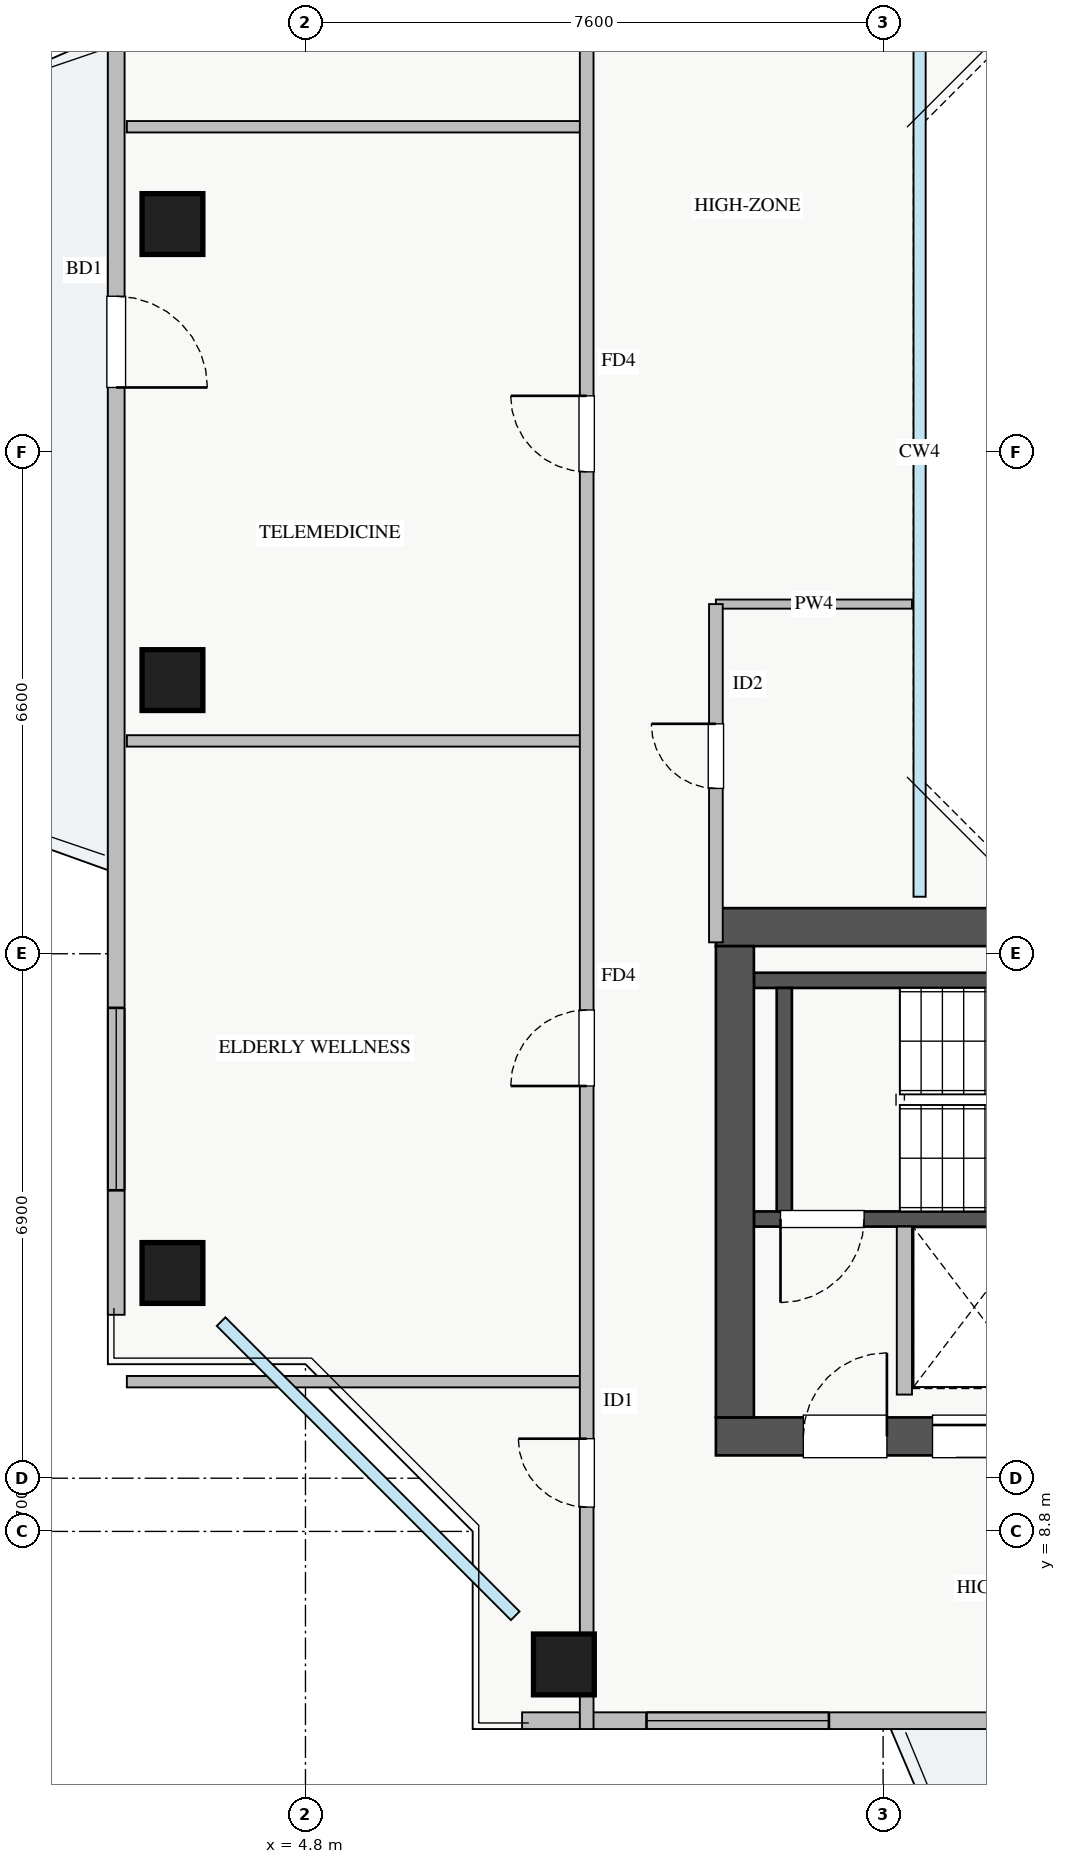
"""IFC4 building model, lengths in metres.
Left out: names, types, materials, properties, quantities, classifications, styles, units other than length and angle.
Written with IfcOpenShell. Run it as: python <this file> out.ifc"""

import sys

from ifc_helpers import new_model, si_unit, direction, frame, frame_2d, origin, origin_2d, place, context, subcontext, project, spatial, rectangle, extrude, source, transform, mapped, element, fill, save


model = new_model("IFC4")
c1 = context("Model", 3, precision=1e-05, world=origin(), true_north=direction((0.0, 1.0)))
c2 = subcontext(c1, "Body", "Model", "MODEL_VIEW")
j1 = project(units=[si_unit("LENGTHUNIT", "METRE"), si_unit("PLANEANGLEUNIT", "RADIAN")], contexts=[c1])
p1 = place(None, origin())
s1 = spatial("IfcSite", under=j1, at=p1, CompositionType="ELEMENT")
p2 = place(p1, origin())
s2 = spatial("IfcBuilding", under=s1, at=p2, CompositionType="ELEMENT")
p3 = place(p2, frame((0.0, 0.0, 223.0)))
s3 = spatial("IfcBuildingStorey", under=s2, at=p3, CompositionType="ELEMENT", Elevation=223.0)
p4 = place(p3, frame((12.68, 12.8, 0.0), z_axis=(0.0, 0.0, 1.0), x_axis=(1.0, 0.0, 0.0)))
e1 = element("IfcWall", 1, at=p4, inside=s3, PredefinedType="SHEAR", context=c2, shape_type="SweptSolid", body=[
    extrude(rectangle(XDim=1.94, YDim=0.18, at=frame_2d((0.97, 0.0))), origin(), (0.0, 0.0, 1.0), 3.07),
])
p5 = place(p3, frame((10.7, 12.91, 0.0), z_axis=(0.0, 0.0, 1.0), x_axis=(1.0, 0.0, 0.0)))
e2 = element("IfcWall", 2, at=p5, inside=s3, PredefinedType="SHEAR", context=c2, shape_type="SweptSolid", body=[
    extrude(rectangle(XDim=7.45, YDim=0.2, at=frame_2d((3.725, 0.0))), origin(), (0.0, 0.0, 1.0), 3.25),
])
p6 = place(p5, frame((0.35, 0.0, 0.0)))
e3 = element("IfcOpeningElement", 3, at=p6, cuts=e2, PredefinedType="OPENING", context=c2, shape_type="SweptSolid", body=[
    extrude(rectangle(XDim=1.1, YDim=2.05, at=frame_2d((0.55, 1.025))), frame((0.0, 0.11, 0.0), z_axis=(0.0, -1.0, 0.0), x_axis=(1.0, 0.0, 0.0)), (0.0, 0.0, 1.0), 0.22),
])
p7 = place(p3, frame((10.7, 16.05, 0.0), z_axis=(0.0, 0.0, 1.0), x_axis=(1.0, 0.0, 0.0)))
e4 = element("IfcWall", 4, at=p7, inside=s3, PredefinedType="SHEAR", context=c2, shape_type="SweptSolid", body=[
    extrude(rectangle(XDim=7.45, YDim=0.2, at=frame_2d((3.725, 0.0))), origin(), (0.0, 0.0, 1.0), 3.25),
])
p8 = place(p3, frame((11.1, 13.01, 0.0), z_axis=(0.0, 0.0, 1.0), x_axis=(0.0, 1.0, 0.0)))
e5 = element("IfcWall", 5, at=p8, inside=s3, PredefinedType="SHEAR", context=c2, shape_type="SweptSolid", body=[
    extrude(rectangle(XDim=2.94, YDim=0.2, at=frame_2d((1.47, 0.0))), origin(), (0.0, 0.0, 1.0), 3.25),
])
p9 = place(p3, frame((10.2, 10.05, 0.0), z_axis=(0.0, 0.0, 1.0), x_axis=(1.0, 0.0, 0.0)))
e6 = element("IfcWall", 6, at=p9, inside=s3, PredefinedType="SHEAR", context=c2, shape_type="SweptSolid", body=[
    extrude(rectangle(XDim=17.6, YDim=0.5, at=frame_2d((8.8, 0.0))), origin(), (0.0, 0.0, 1.0), 3.25),
])
p10 = place(p9, frame((1.15, 0.0, 0.0)))
e7 = element("IfcOpeningElement", 7, at=p10, cuts=e6, PredefinedType="OPENING", context=c2, shape_type="SweptSolid", body=[
    extrude(rectangle(XDim=1.1, YDim=2.05, at=frame_2d((0.55, 1.025))), frame((0.0, 0.26, 0.0), z_axis=(0.0, -1.0, 0.0), x_axis=(1.0, 0.0, 0.0)), (0.0, 0.0, 1.0), 0.52),
])
p11 = place(p9, frame((8.3, 0.0, 0.0)))
e8 = element("IfcOpeningElement", 8, at=p11, cuts=e6, PredefinedType="OPENING", context=c2, shape_type="SweptSolid", body=[
    extrude(rectangle(XDim=1.1, YDim=2.05, at=frame_2d((0.55, 1.025))), frame((0.0, 0.26, 0.0), z_axis=(0.0, -1.0, 0.0), x_axis=(1.0, 0.0, 0.0)), (0.0, 0.0, 1.0), 0.52),
])
p12 = place(p9, frame((2.85, 0.0, 0.0)))
e9 = element("IfcOpeningElement", 9, at=p12, cuts=e6, PredefinedType="OPENING", context=c2, shape_type="SweptSolid", body=[
    extrude(rectangle(XDim=1.1, YDim=2.05, at=frame_2d((0.55, 1.025))), frame((0.0, 0.26, 0.0), z_axis=(0.0, -1.0, 0.0), x_axis=(1.0, 0.0, 0.0)), (0.0, 0.0, 1.0), 0.52),
])
p13 = place(p9, frame((5.8, 0.0, 0.0)))
e10 = element("IfcOpeningElement", 10, at=p13, cuts=e6, PredefinedType="OPENING", context=c2, shape_type="SweptSolid", body=[
    extrude(rectangle(XDim=1.0, YDim=2.05, at=frame_2d((0.5, 1.025))), frame((0.0, 0.26, 0.0), z_axis=(0.0, -1.0, 0.0), x_axis=(1.0, 0.0, 0.0)), (0.0, 0.0, 1.0), 0.52),
])
p14 = place(p9, frame((14.74, 0.0, 0.0)))
e11 = element("IfcOpeningElement", 11, at=p14, cuts=e6, PredefinedType="OPENING", context=c2, shape_type="SweptSolid", body=[
    extrude(rectangle(XDim=1.0, YDim=2.05, at=frame_2d((0.5, 1.025))), frame((0.0, 0.26, 0.0), z_axis=(0.0, -1.0, 0.0), x_axis=(1.0, 0.0, 0.0)), (0.0, 0.0, 1.0), 0.52),
])
p15 = place(p9, frame((10.155, 0.0, 0.0)))
e12 = element("IfcOpeningElement", 12, at=p15, cuts=e6, PredefinedType="OPENING", context=c2, shape_type="SweptSolid", body=[
    extrude(rectangle(XDim=1.0, YDim=2.05, at=frame_2d((0.5, 1.025))), frame((0.0, 0.26, 0.0), z_axis=(0.0, -1.0, 0.0), x_axis=(1.0, 0.0, 0.0)), (0.0, 0.0, 1.0), 0.52),
])
p16 = place(p9, frame((11.87, 0.0, 0.0)))
e13 = element("IfcOpeningElement", 13, at=p16, cuts=e6, PredefinedType="OPENING", context=c2, shape_type="SweptSolid", body=[
    extrude(rectangle(XDim=1.0, YDim=2.05, at=frame_2d((0.5, 1.025))), frame((0.0, 0.26, 0.0), z_axis=(0.0, -1.0, 0.0), x_axis=(1.0, 0.0, 0.0)), (0.0, 0.0, 1.0), 0.52),
])
p17 = place(p9, frame((13.46, 0.0, 0.0)))
e14 = element("IfcOpeningElement", 14, at=p17, cuts=e6, PredefinedType="OPENING", context=c2, shape_type="SweptSolid", body=[
    extrude(rectangle(XDim=1.0, YDim=2.05, at=frame_2d((0.5, 1.025))), frame((0.0, 0.26, 0.0), z_axis=(0.0, -1.0, 0.0), x_axis=(1.0, 0.0, 0.0)), (0.0, 0.0, 1.0), 0.52),
])
p18 = place(p3, frame((10.2, 16.75, 0.0), z_axis=(0.0, 0.0, 1.0), x_axis=(1.0, 0.0, 0.0)))
e15 = element("IfcWall", 15, at=p18, inside=s3, PredefinedType="SHEAR", context=c2, shape_type="SweptSolid", body=[
    extrude(rectangle(XDim=17.6, YDim=0.5, at=frame_2d((8.8, 0.0))), origin(), (0.0, 0.0, 1.0), 3.25),
])
p19 = place(p3, frame((10.45, 10.3, 0.0), z_axis=(0.0, 0.0, 1.0), x_axis=(0.0, 1.0, 0.0)))
e16 = element("IfcWall", 16, at=p19, inside=s3, PredefinedType="SHEAR", context=c2, shape_type="SweptSolid", body=[
    extrude(rectangle(XDim=6.2, YDim=0.5, at=frame_2d((3.1, 0.0))), origin(), (0.0, 0.0, 1.0), 3.25),
])
m1 = source(origin(), c2, "Body", "SweptSolid", [
    extrude(rectangle(XDim=0.8, YDim=0.8, at=origin_2d()), origin(), (0.0, 0.0, 1.0), 3.25),
])
for number, where, z_axis, x_axis in (
    (17, (8.2, 7.05, 0.0), (0.0, 0.0, 1.0), (1.0, 0.0, 0.0)),
    (18, (3.05, 26.0, 0.0), (0.0, 0.0, 1.0), (1.0, 0.0, 0.0)),
    (19, (3.05, 20.0, 0.0), (0.0, 0.0, 1.0), (1.0, 0.0, 0.0)),
    (20, (3.05, 12.2, 0.0), (0.0, 0.0, 1.0), (1.0, 0.0, 0.0)),
):
    element("IfcColumn", number, at=place(p3, frame(where, z_axis=z_axis, x_axis=x_axis)), inside=s3, PredefinedType="COLUMN", context=c2, shape_type="MappedRepresentation", body=[
        mapped(m1, transform((0.0, 0.0, 0.0), x_axis=(1.0, 0.0, 0.0), y_axis=(0.0, 1.0, 0.0), z_axis=(0.0, 0.0, 1.0), scale=1.0)),
    ])
p20 = place(p3, frame((7.65, 6.31, 0.0), z_axis=(0.0, 0.0, 1.0), x_axis=(1.0, 0.0, 0.0)))
e21 = element("IfcWall", 21, at=p20, inside=s3, PredefinedType="STANDARD", context=c2, shape_type="SweptSolid", body=[
    extrude(rectangle(XDim=22.7, YDim=0.22, at=frame_2d((11.35, 0.0))), origin(), (0.0, 0.0, 1.0), 2.61),
])
p21 = place(p20, frame((12.2, 0.0, 0.0)))
e22 = element("IfcOpeningElement", 22, at=p21, cuts=e21, PredefinedType="OPENING", context=c2, shape_type="SweptSolid", body=[
    extrude(rectangle(XDim=1.2, YDim=2.1, at=frame_2d((0.6, 1.05))), frame((0.0, 0.12, 0.0), z_axis=(0.0, -1.0, 0.0), x_axis=(1.0, 0.0, 0.0)), (0.0, 0.0, 1.0), 0.24),
])
p22 = place(p20, frame((1.637, 0.0, 0.9)))
e23 = element("IfcOpeningElement", 23, at=p22, cuts=e21, PredefinedType="OPENING", context=c2, shape_type="SweptSolid", body=[
    extrude(rectangle(XDim=2.4, YDim=1.48, at=frame_2d((1.2, 0.74))), frame((0.0, 0.12, 0.0), z_axis=(0.0, -1.0, 0.0), x_axis=(1.0, 0.0, 0.0)), (0.0, 0.0, 1.0), 0.24),
])
p23 = place(p20, frame((7.612, 0.0, 0.9)))
e24 = element("IfcOpeningElement", 24, at=p23, cuts=e21, PredefinedType="OPENING", context=c2, shape_type="SweptSolid", body=[
    extrude(rectangle(XDim=1.8, YDim=1.45, at=frame_2d((0.9, 0.725))), frame((0.0, 0.12, 0.0), z_axis=(0.0, -1.0, 0.0), x_axis=(1.0, 0.0, 0.0)), (0.0, 0.0, 1.0), 0.24),
])
p24 = place(p20, frame((19.788, 0.0, 0.9)))
e25 = element("IfcOpeningElement", 25, at=p24, cuts=e21, PredefinedType="OPENING", context=c2, shape_type="SweptSolid", body=[
    extrude(rectangle(XDim=2.1, YDim=1.5, at=frame_2d((1.05, 0.75))), frame((0.0, 0.12, 0.0), z_axis=(0.0, -1.0, 0.0), x_axis=(1.0, 0.0, 0.0)), (0.0, 0.0, 1.0), 0.24),
])
p25 = place(p3, frame((2.31, 11.65, 0.0), z_axis=(0.0, 0.0, 1.0), x_axis=(0.0, 1.0, 0.0)))
e26 = element("IfcWall", 26, at=p25, inside=s3, PredefinedType="STANDARD", context=c2, shape_type="SweptSolid", body=[
    extrude(rectangle(XDim=22.7, YDim=0.22, at=frame_2d((11.35, 0.0))), origin(), (0.0, 0.0, 1.0), 2.61),
])
p26 = place(p25, frame((12.2, 0.0, 0.0)))
e27 = element("IfcOpeningElement", 27, at=p26, cuts=e26, PredefinedType="OPENING", context=c2, shape_type="SweptSolid", body=[
    extrude(rectangle(XDim=1.2, YDim=2.1, at=frame_2d((0.6, 1.05))), frame((0.0, 0.12, 0.0), z_axis=(0.0, -1.0, 0.0), x_axis=(1.0, 0.0, 0.0)), (0.0, 0.0, 1.0), 0.24),
])
p27 = place(p25, frame((1.638, 0.0, 0.9)))
e28 = element("IfcOpeningElement", 28, at=p27, cuts=e26, PredefinedType="OPENING", context=c2, shape_type="SweptSolid", body=[
    extrude(rectangle(XDim=2.4, YDim=1.48, at=frame_2d((1.2, 0.74))), frame((0.0, 0.12, 0.0), z_axis=(0.0, -1.0, 0.0), x_axis=(1.0, 0.0, 0.0)), (0.0, 0.0, 1.0), 0.24),
])
p28 = place(p25, frame((18.813, 0.0, 0.9)))
e29 = element("IfcOpeningElement", 29, at=p28, cuts=e26, PredefinedType="OPENING", context=c2, shape_type="SweptSolid", body=[
    extrude(rectangle(XDim=2.1, YDim=1.48, at=frame_2d((1.05, 0.74))), frame((0.0, 0.12, 0.0), z_axis=(0.0, -1.0, 0.0), x_axis=(1.0, 0.0, 0.0)), (0.0, 0.0, 1.0), 0.24),
])
p29 = place(p3, frame((12.68, 10.6, 0.0), z_axis=(0.0, 0.0, 1.0), x_axis=(0.0, 1.0, 0.0)))
e30 = element("IfcWall", 30, at=p29, inside=s3, PredefinedType="PARTITIONING", context=c2, shape_type="SweptSolid", body=[
    extrude(rectangle(XDim=2.21, YDim=0.2, at=frame_2d((1.105, 0.0))), origin(), (0.0, 0.0, 1.0), 3.07),
])
for number, where, z_axis, x_axis in (
    (31, (2.45, 10.77, 0.0), (0.0, 0.0, 1.0), (1.0, 0.0, 0.0)),
    (32, (2.45, 19.2, 0.0), (0.0, 0.0, 1.0), (1.0, 0.0, 0.0)),
    (33, (2.45, 27.28, 0.0), (0.0, 0.0, 1.0), (1.0, 0.0, 0.0)),
):
    element("IfcWall", number, at=place(p3, frame(where, z_axis=z_axis, x_axis=x_axis)), inside=s3, PredefinedType="PARTITIONING", context=c2, shape_type="SweptSolid", body=[
        extrude(rectangle(XDim=6.05, YDim=0.15, at=frame_2d((3.025, 0.0))), origin(), (0.0, 0.0, 1.0), 3.07),
    ])
p30 = place(p3, frame((8.5, 6.2, 0.0), z_axis=(0.0, 0.0, 1.0), x_axis=(0.0, 1.0, 0.0)))
e34 = element("IfcWall", 34, at=p30, inside=s3, PredefinedType="PARTITIONING", context=c2, shape_type="SweptSolid", body=[
    extrude(rectangle(XDim=33.6, YDim=0.18, at=frame_2d((16.8, 0.0))), origin(), (0.0, 0.0, 1.0), 3.07),
])
p31 = place(p30, frame((29.605, 0.0, 0.0)))
e35 = element("IfcOpeningElement", 35, at=p31, cuts=e34, PredefinedType="OPENING", context=c2, shape_type="SweptSolid", body=[
    extrude(rectangle(XDim=0.9, YDim=2.05, at=frame_2d((0.45, 1.025))), frame((0.0, 0.1, 0.0), z_axis=(0.0, -1.0, 0.0), x_axis=(1.0, 0.0, 0.0)), (0.0, 0.0, 1.0), 0.2),
])
p32 = place(p30, frame((2.92, 0.0, 0.0)))
e36 = element("IfcOpeningElement", 36, at=p32, cuts=e34, PredefinedType="OPENING", context=c2, shape_type="SweptSolid", body=[
    extrude(rectangle(XDim=0.9, YDim=2.05, at=frame_2d((0.45, 1.025))), frame((0.0, 0.1, 0.0), z_axis=(0.0, -1.0, 0.0), x_axis=(1.0, 0.0, 0.0)), (0.0, 0.0, 1.0), 0.2),
])
p33 = place(p30, frame((8.46, 0.0, 0.0)))
e37 = element("IfcOpeningElement", 37, at=p33, cuts=e34, PredefinedType="OPENING", context=c2, shape_type="SweptSolid", body=[
    extrude(rectangle(XDim=1.0, YDim=2.05, at=frame_2d((0.5, 1.025))), frame((0.0, 0.1, 0.0), z_axis=(0.0, -1.0, 0.0), x_axis=(1.0, 0.0, 0.0)), (0.0, 0.0, 1.0), 0.2),
])
p34 = place(p30, frame((16.54, 0.0, 0.0)))
e38 = element("IfcOpeningElement", 38, at=p34, cuts=e34, PredefinedType="OPENING", context=c2, shape_type="SweptSolid", body=[
    extrude(rectangle(XDim=1.0, YDim=2.05, at=frame_2d((0.5, 1.025))), frame((0.0, 0.1, 0.0), z_axis=(0.0, -1.0, 0.0), x_axis=(1.0, 0.0, 0.0)), (0.0, 0.0, 1.0), 0.2),
])
p35 = place(p30, frame((24.38, 0.0, 0.0)))
e39 = element("IfcOpeningElement", 39, at=p35, cuts=e34, PredefinedType="OPENING", context=c2, shape_type="SweptSolid", body=[
    extrude(rectangle(XDim=1.0, YDim=2.05, at=frame_2d((0.5, 1.025))), frame((0.0, 0.1, 0.0), z_axis=(0.0, -1.0, 0.0), x_axis=(1.0, 0.0, 0.0)), (0.0, 0.0, 1.0), 0.2),
])
p36 = place(p3, frame((10.2, 21.0, 0.0), z_axis=(0.0, 0.0, 1.0), x_axis=(1.0, 0.0, 0.0)))
e40 = element("IfcWall", 40, at=p36, inside=s3, PredefinedType="PLUMBINGWALL", context=c2, shape_type="SweptSolid", body=[
    extrude(rectangle(XDim=2.58, YDim=0.12, at=frame_2d((1.29, 0.0))), origin(), (0.0, 0.0, 1.0), 3.07),
])
p37 = place(p3, frame((10.2, 16.55, 0.0), z_axis=(0.0, 0.0, 1.0), x_axis=(0.0, 1.0, 0.0)))
e41 = element("IfcWall", 41, at=p37, inside=s3, PredefinedType="PARTITIONING", context=c2, shape_type="SweptSolid", body=[
    extrude(rectangle(XDim=4.45, YDim=0.18, at=frame_2d((2.225, 0.0))), origin(), (0.0, 0.0, 1.0), 3.07),
])
p38 = place(p37, frame((2.025, 0.0, 0.0)))
e42 = element("IfcOpeningElement", 42, at=p38, cuts=e41, PredefinedType="OPENING", context=c2, shape_type="SweptSolid", body=[
    extrude(rectangle(XDim=0.85, YDim=2.05, at=frame_2d((0.425, 1.025))), frame((0.0, 0.1, 0.0), z_axis=(0.0, -1.0, 0.0), x_axis=(1.0, 0.0, 0.0)), (0.0, 0.0, 1.0), 0.2),
])
m2 = source(origin(), c2, "Body", "SweptSolid", [
    extrude(rectangle(XDim=2.4, YDim=1.48, at=frame_2d((1.2, 0.74))), frame((0.0, 0.03, 0.0), z_axis=(0.0, -1.0, 0.0), x_axis=(1.0, 0.0, 0.0)), (0.0, 0.0, 1.0), 0.06),
])
p39 = place(p22, origin())
e43 = element("IfcWindow", 43, at=p39, inside=s3, PartitioningType="TRIPLE_PANEL_VERTICAL", PredefinedType="WINDOW", context=c2, shape_type="MappedRepresentation", body=[
    mapped(m2, transform((0.0, 0.0, 0.0), x_axis=(1.0, 0.0, 0.0), y_axis=(0.0, 1.0, 0.0), z_axis=(0.0, 0.0, 1.0), scale=1.0)),
])
fill(e23, e43)
m3 = source(origin(), c2, "Body", "SweptSolid", [
    extrude(rectangle(XDim=1.2, YDim=2.1, at=frame_2d((0.6, 1.05))), frame((0.0, 0.025, 0.0), z_axis=(0.0, -1.0, 0.0), x_axis=(1.0, 0.0, 0.0)), (0.0, 0.0, 1.0), 0.05),
])
p40 = place(p26, frame((1.2, 0.0, 0.0), z_axis=(0.0, 0.0, 1.0), x_axis=(-1.0, 0.0, 0.0)))
e44 = element("IfcDoor", 44, at=p40, inside=s3, OperationType="SINGLE_SWING_LEFT", PredefinedType="DOOR", context=c2, shape_type="MappedRepresentation", body=[
    mapped(m3, transform((0.0, 0.0, 0.0), x_axis=(1.0, 0.0, 0.0), y_axis=(0.0, 1.0, 0.0), z_axis=(0.0, 0.0, 1.0), scale=1.0)),
])
fill(e27, e44)
p41 = place(p27, origin())
e45 = element("IfcWindow", 45, at=p41, inside=s3, PartitioningType="TRIPLE_PANEL_VERTICAL", PredefinedType="WINDOW", context=c2, shape_type="MappedRepresentation", body=[
    mapped(m2, transform((0.0, 0.0, 0.0), x_axis=(1.0, 0.0, 0.0), y_axis=(0.0, 1.0, 0.0), z_axis=(0.0, 0.0, 1.0), scale=1.0)),
])
fill(e28, e45)
m4 = source(origin(), c2, "Body", "SweptSolid", [
    extrude(rectangle(XDim=1.1, YDim=2.05, at=frame_2d((0.55, 1.025))), frame((0.0, 0.025, 0.0), z_axis=(0.0, -1.0, 0.0), x_axis=(1.0, 0.0, 0.0)), (0.0, 0.0, 1.0), 0.05),
])
p42 = place(p10, origin())
e46 = element("IfcDoor", 46, at=p42, inside=s3, OperationType="SINGLE_SWING_RIGHT", PredefinedType="DOOR", context=c2, shape_type="MappedRepresentation", body=[
    mapped(m4, transform((0.0, 0.0, 0.0), x_axis=(1.0, 0.0, 0.0), y_axis=(0.0, 1.0, 0.0), z_axis=(0.0, 0.0, 1.0), scale=1.0)),
])
fill(e7, e46)
p43 = place(p6, frame((1.1, 0.0, 0.0), z_axis=(0.0, 0.0, 1.0), x_axis=(-1.0, 0.0, 0.0)))
e47 = element("IfcDoor", 47, at=p43, inside=s3, OperationType="SINGLE_SWING_LEFT", PredefinedType="DOOR", context=c2, shape_type="MappedRepresentation", body=[
    mapped(m4, transform((0.0, 0.0, 0.0), x_axis=(1.0, 0.0, 0.0), y_axis=(0.0, 1.0, 0.0), z_axis=(0.0, 0.0, 1.0), scale=1.0)),
])
fill(e3, e47)
p44 = place(p12, origin())
e48 = element("IfcDoor", 48, at=p44, inside=s3, OperationType="SLIDING_TO_RIGHT", PredefinedType="DOOR", context=c2, shape_type="MappedRepresentation", body=[
    mapped(m4, transform((0.0, 0.0, 0.0), x_axis=(1.0, 0.0, 0.0), y_axis=(0.0, 1.0, 0.0), z_axis=(0.0, 0.0, 1.0), scale=1.0)),
])
fill(e9, e48)
m5 = source(origin(), c2, "Body", "SweptSolid", [
    extrude(rectangle(XDim=0.9, YDim=2.05, at=frame_2d((0.45, 1.025))), frame((0.0, 0.025, 0.0), z_axis=(0.0, -1.0, 0.0), x_axis=(1.0, 0.0, 0.0)), (0.0, 0.0, 1.0), 0.05),
])
p45 = place(p32, origin())
e49 = element("IfcDoor", 49, at=p45, inside=s3, OperationType="SINGLE_SWING_RIGHT", PredefinedType="DOOR", context=c2, shape_type="MappedRepresentation", body=[
    mapped(m5, transform((0.0, 0.0, 0.0), x_axis=(1.0, 0.0, 0.0), y_axis=(0.0, 1.0, 0.0), z_axis=(0.0, 0.0, 1.0), scale=1.0)),
])
fill(e36, e49)
m6 = source(origin(), c2, "Body", "SweptSolid", [
    extrude(rectangle(XDim=1.0, YDim=2.05, at=frame_2d((0.5, 1.025))), frame((0.0, 0.025, 0.0), z_axis=(0.0, -1.0, 0.0), x_axis=(1.0, 0.0, 0.0)), (0.0, 0.0, 1.0), 0.05),
])
p46 = place(p33, origin())
e50 = element("IfcDoor", 50, at=p46, inside=s3, OperationType="SINGLE_SWING_LEFT", PredefinedType="DOOR", context=c2, shape_type="MappedRepresentation", body=[
    mapped(m6, transform((0.0, 0.0, 0.0), x_axis=(1.0, 0.0, 0.0), y_axis=(0.0, 1.0, 0.0), z_axis=(0.0, 0.0, 1.0), scale=1.0)),
])
fill(e37, e50)
p47 = place(p34, origin())
e51 = element("IfcDoor", 51, at=p47, inside=s3, OperationType="SINGLE_SWING_RIGHT", PredefinedType="DOOR", context=c2, shape_type="MappedRepresentation", body=[
    mapped(m6, transform((0.0, 0.0, 0.0), x_axis=(1.0, 0.0, 0.0), y_axis=(0.0, 1.0, 0.0), z_axis=(0.0, 0.0, 1.0), scale=1.0)),
])
fill(e38, e51)
m7 = source(origin(), c2, "Body", "SweptSolid", [
    extrude(rectangle(XDim=0.85, YDim=2.05, at=frame_2d((0.425, 1.025))), frame((0.0, 0.025, 0.0), z_axis=(0.0, -1.0, 0.0), x_axis=(1.0, 0.0, 0.0)), (0.0, 0.0, 1.0), 0.05),
])
p48 = place(p38, origin())
e52 = element("IfcDoor", 52, at=p48, inside=s3, OperationType="SINGLE_SWING_RIGHT", PredefinedType="DOOR", context=c2, shape_type="MappedRepresentation", body=[
    mapped(m7, transform((0.0, 0.0, 0.0), x_axis=(1.0, 0.0, 0.0), y_axis=(0.0, 1.0, 0.0), z_axis=(0.0, 0.0, 1.0), scale=1.0)),
])
fill(e42, e52)
save(model, sys.argv[1])
